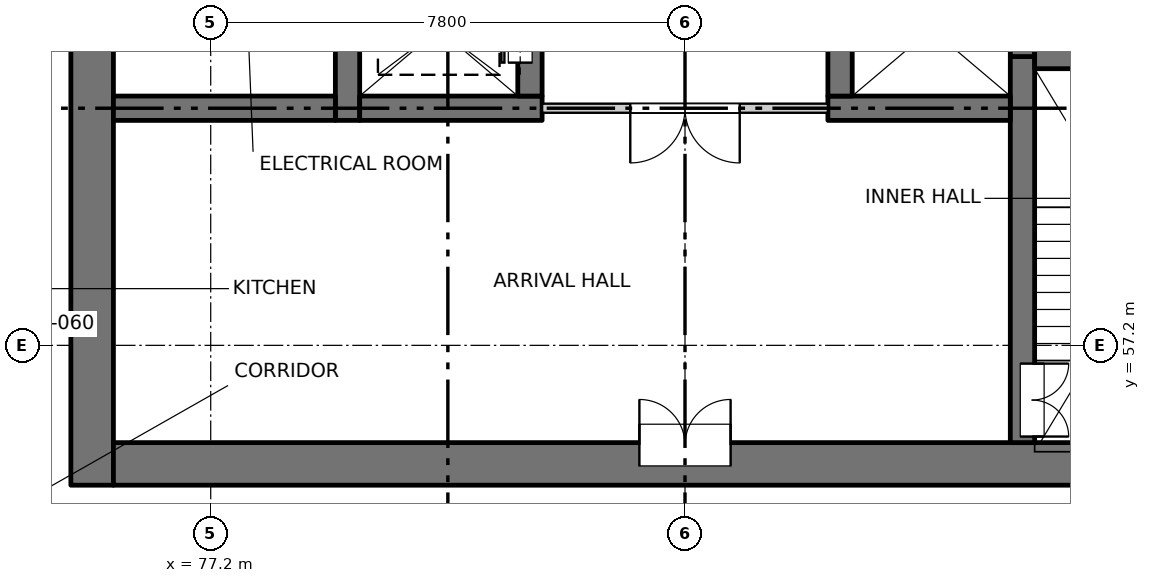
"""IFC4 building model, lengths in metres.
Left out: names, types, materials, properties, quantities, classifications, styles, units other than length and angle.
Written with IfcOpenShell. Run it as: python <this file> out.ifc"""

import sys

from ifc_helpers import new_model, si_unit, direction, frame, frame_2d, origin, place, context, subcontext, project, spatial, rectangle, extrude, element, fill, save


model = new_model("IFC4")
c1 = context("Model", 3, precision=1e-05, world=origin(), true_north=direction((0.0, 1.0)))
c2 = subcontext(c1, "Body", "Model", "MODEL_VIEW")
j1 = project(units=[si_unit("LENGTHUNIT", "METRE"), si_unit("PLANEANGLEUNIT", "RADIAN")], contexts=[c1])
p1 = place(None, origin())
s1 = spatial("IfcSite", under=j1, at=p1, CompositionType="ELEMENT")
p2 = place(p1, origin())
s2 = spatial("IfcBuilding", under=s1, at=p2, CompositionType="ELEMENT")
p3 = place(p2, frame((0.0, 0.0, 58.0)))
s3 = spatial("IfcBuildingStorey", under=s2, at=p3, CompositionType="ELEMENT", Elevation=58.0)
p4 = place(p3, frame((75.25, 54.9, -0.25), z_axis=(0.0, 0.0, 1.0), x_axis=(0.0, 1.0, 0.0)))
e1 = element("IfcWall", 1, at=p4, inside=s3, PredefinedType="SOLIDWALL", context=c2, shape_type="SweptSolid", body=[
    extrude(rectangle(XDim=22.4, YDim=0.7, at=frame_2d((11.2, 0.0))), origin(), (0.0, 0.0, 1.0), 3.4),
])
p5 = place(p4, frame((7.55, 0.0, 0.25)))
e2 = element("IfcOpeningElement", 2, at=p5, cuts=e1, PredefinedType="OPENING", context=c2, shape_type="SweptSolid", body=[
    extrude(rectangle(XDim=0.9, YDim=2.1, at=frame_2d((0.45, 1.05))), frame((0.0, 0.36, 0.0), z_axis=(0.0, -1.0, 0.0), x_axis=(1.0, 0.0, 0.0)), (0.0, 0.0, 1.0), 0.72),
])
p6 = place(p4, frame((12.2, 0.0, 0.25)))
e3 = element("IfcOpeningElement", 3, at=p6, cuts=e1, PredefinedType="OPENING", context=c2, shape_type="SweptSolid", body=[
    extrude(rectangle(XDim=0.9, YDim=2.1, at=frame_2d((0.45, 1.05))), frame((0.0, 0.36, 0.0), z_axis=(0.0, -1.0, 0.0), x_axis=(1.0, 0.0, 0.0)), (0.0, 0.0, 1.0), 0.72),
])
p7 = place(p4, frame((16.7, 0.0, 0.25)))
e4 = element("IfcOpeningElement", 4, at=p7, cuts=e1, PredefinedType="OPENING", context=c2, shape_type="SweptSolid", body=[
    extrude(rectangle(XDim=0.9, YDim=2.1, at=frame_2d((0.45, 1.05))), frame((0.0, 0.36, 0.0), z_axis=(0.0, -1.0, 0.0), x_axis=(1.0, 0.0, 0.0)), (0.0, 0.0, 1.0), 0.72),
])
p8 = place(p4, frame((20.15, 0.0, 0.25)))
e5 = element("IfcOpeningElement", 5, at=p8, cuts=e1, PredefinedType="OPENING", context=c2, shape_type="SweptSolid", body=[
    extrude(rectangle(XDim=0.9, YDim=2.1, at=frame_2d((0.45, 1.05))), frame((0.0, 0.36, 0.0), z_axis=(0.0, -1.0, 0.0), x_axis=(1.0, 0.0, 0.0)), (0.0, 0.0, 1.0), 0.72),
])
p9 = place(p3, frame((75.6, 55.25, -0.25), z_axis=(0.0, 0.0, 1.0), x_axis=(1.0, 0.0, 0.0)))
e6 = element("IfcWall", 6, at=p9, inside=s3, PredefinedType="SOLIDWALL", context=c2, shape_type="SweptSolid", body=[
    extrude(rectangle(XDim=18.8, YDim=0.7, at=frame_2d((9.4, 0.0))), origin(), (0.0, 0.0, 1.0), 3.4),
])
p10 = place(p9, frame((8.65, 0.0, 0.25)))
e7 = element("IfcOpeningElement", 7, at=p10, cuts=e6, PredefinedType="OPENING", context=c2, shape_type="SweptSolid", body=[
    extrude(rectangle(XDim=1.5, YDim=2.1, at=frame_2d((0.75, 1.05))), frame((0.0, 0.36, 0.0), z_axis=(0.0, -1.0, 0.0), x_axis=(1.0, 0.0, 0.0)), (0.0, 0.0, 1.0), 0.72),
])
p11 = place(p3, frame((79.45, 60.9, -0.25), z_axis=(0.0, 0.0, 1.0), x_axis=(0.0, 1.0, 0.0)))
e8 = element("IfcWall", 8, at=p11, inside=s3, PredefinedType="SOLIDWALL", context=c2, shape_type="SweptSolid", body=[
    extrude(rectangle(XDim=16.4, YDim=0.4, at=frame_2d((8.2, 0.0))), origin(), (0.0, 0.0, 1.0), 3.4),
])
p12 = place(p3, frame((90.55, 55.6, -0.25), z_axis=(0.0, 0.0, 1.0), x_axis=(0.0, 1.0, 0.0)))
e9 = element("IfcWall", 9, at=p12, inside=s3, PredefinedType="SOLIDWALL", context=c2, shape_type="SweptSolid", body=[
    extrude(rectangle(XDim=6.35, YDim=0.4, at=frame_2d((3.175, 0.0))), origin(), (0.0, 0.0, 1.0), 3.4),
])
p13 = place(p12, frame((0.1, 0.0, 0.25)))
e10 = element("IfcOpeningElement", 10, at=p13, cuts=e9, PredefinedType="OPENING", context=c2, shape_type="SweptSolid", body=[
    extrude(rectangle(XDim=1.2, YDim=2.1, at=frame_2d((0.6, 1.05))), frame((0.0, 0.21, 0.0), z_axis=(0.0, -1.0, 0.0), x_axis=(1.0, 0.0, 0.0)), (0.0, 0.0, 1.0), 0.42),
])
p14 = place(p3, frame((90.55, 61.95, -0.25), z_axis=(0.0, 0.0, 1.0), x_axis=(0.0, 1.0, 0.0)))
e11 = element("IfcWall", 11, at=p14, inside=s3, PredefinedType="SOLIDWALL", context=c2, shape_type="SweptSolid", body=[
    extrude(rectangle(XDim=15.35, YDim=0.4, at=frame_2d((7.675, 0.0))), origin(), (0.0, 0.0, 1.0), 3.4),
])
p15 = place(p3, frame((79.65, 61.1, -0.25), z_axis=(0.0, 0.0, 1.0), x_axis=(1.0, 0.0, 0.0)))
e12 = element("IfcWall", 12, at=p15, inside=s3, PredefinedType="SOLIDWALL", context=c2, shape_type="SweptSolid", body=[
    extrude(rectangle(XDim=3.0, YDim=0.4, at=frame_2d((1.5, 0.0))), origin(), (0.0, 0.0, 1.0), 3.4),
])
p16 = place(p3, frame((82.45, 61.3, -0.25), z_axis=(0.0, 0.0, 1.0), x_axis=(0.0, 1.0, 0.0)))
e13 = element("IfcWall", 13, at=p16, inside=s3, PredefinedType="SOLIDWALL", context=c2, shape_type="SweptSolid", body=[
    extrude(rectangle(XDim=2.2, YDim=0.4, at=frame_2d((1.1, 0.0))), origin(), (0.0, 0.0, 1.0), 3.4),
])
p17 = place(p16, frame((0.55, 0.0, 0.25)))
e14 = element("IfcOpeningElement", 14, at=p17, cuts=e13, PredefinedType="OPENING", context=c2, shape_type="SweptSolid", body=[
    extrude(rectangle(XDim=1.1, YDim=2.1, at=frame_2d((0.55, 1.05))), frame((0.0, 0.21, 0.0), z_axis=(0.0, -1.0, 0.0), x_axis=(1.0, 0.0, 0.0)), (0.0, 0.0, 1.0), 0.42),
])
p18 = place(p3, frame((87.35, 61.1, -0.25), z_axis=(0.0, 0.0, 1.0), x_axis=(1.0, 0.0, 0.0)))
e15 = element("IfcWall", 15, at=p18, inside=s3, PredefinedType="SOLIDWALL", context=c2, shape_type="SweptSolid", body=[
    extrude(rectangle(XDim=3.0, YDim=0.4, at=frame_2d((1.5, 0.0))), origin(), (0.0, 0.0, 1.0), 3.4),
])
p19 = place(p3, frame((87.55, 61.3, -0.25), z_axis=(0.0, 0.0, 1.0), x_axis=(0.0, 1.0, 0.0)))
e16 = element("IfcWall", 16, at=p19, inside=s3, PredefinedType="SOLIDWALL", context=c2, shape_type="SweptSolid", body=[
    extrude(rectangle(XDim=2.2, YDim=0.4, at=frame_2d((1.1, 0.0))), origin(), (0.0, 0.0, 1.0), 3.4),
])
for number, where, z_axis, x_axis in (
    (17, (75.6, 61.1, -0.25), (0.0, 0.0, 1.0), (1.0, 0.0, 0.0)),
    (18, (90.75, 61.95, -0.25), (0.0, 0.0, 1.0), (1.0, 0.0, 0.0)),
):
    element("IfcWall", number, at=place(p3, frame(where, z_axis=z_axis, x_axis=x_axis)), inside=s3, PredefinedType="SOLIDWALL", context=c2, shape_type="SweptSolid", body=[
        extrude(rectangle(XDim=3.65, YDim=0.4, at=frame_2d((1.825, 0.0))), origin(), (0.0, 0.0, 1.0), 3.4),
    ])
p20 = place(p3, frame((82.65, 61.1, 0.0), z_axis=(0.0, 0.0, 1.0), x_axis=(1.0, 0.0, 0.0)))
e19 = element("IfcWall", 19, at=p20, inside=s3, PredefinedType="PARTITIONING", context=c2, shape_type="SweptSolid", body=[
    extrude(rectangle(XDim=4.7, YDim=0.15, at=frame_2d((2.35, 0.0))), origin(), (0.0, 0.0, 1.0), 3.15),
])
p21 = place(p20, frame((1.45, 0.0, 0.0)))
e20 = element("IfcOpeningElement", 20, at=p21, cuts=e19, PredefinedType="OPENING", context=c2, shape_type="SweptSolid", body=[
    extrude(rectangle(XDim=1.8, YDim=2.1, at=frame_2d((0.9, 1.05))), frame((0.0, 0.085, 0.0), z_axis=(0.0, -1.0, 0.0), x_axis=(1.0, 0.0, 0.0)), (0.0, 0.0, 1.0), 0.17),
])
p22 = place(p10, origin())
e21 = element("IfcDoor", 21, at=p22, inside=s3, OperationType="DOUBLE_DOOR_SINGLE_SWING", PredefinedType="DOOR", context=c2, shape_type="SweptSolid", body=[
    extrude(rectangle(XDim=1.5, YDim=2.1, at=frame_2d((0.75, 1.05))), frame((0.0, 0.335, 0.0), z_axis=(0.0, -1.0, 0.0), x_axis=(1.0, 0.0, 0.0)), (0.0, 0.0, 1.0), 0.05),
])
fill(e7, e21)
p23 = place(p13, origin())
e22 = element("IfcDoor", 22, at=p23, inside=s3, OperationType="DOUBLE_DOOR_SINGLE_SWING", PredefinedType="DOOR", context=c2, shape_type="SweptSolid", body=[
    extrude(rectangle(XDim=1.2, YDim=2.1, at=frame_2d((0.6, 1.05))), frame((0.0, -0.135, 0.0), z_axis=(0.0, -1.0, 0.0), x_axis=(1.0, 0.0, 0.0)), (0.0, 0.0, 1.0), 0.05),
])
fill(e10, e22)
p24 = place(p21, origin())
e23 = element("IfcDoor", 23, at=p24, inside=s3, OperationType="DOUBLE_DOOR_SINGLE_SWING", PredefinedType="DOOR", context=c2, shape_type="SweptSolid", body=[
    extrude(rectangle(XDim=1.8, YDim=2.1, at=frame_2d((0.9, 1.05))), frame((0.0, 0.025, 0.0), z_axis=(0.0, -1.0, 0.0), x_axis=(1.0, 0.0, 0.0)), (0.0, 0.0, 1.0), 0.05),
])
fill(e20, e23)
p25 = place(p17, origin())
e24 = element("IfcDoor", 24, at=p25, inside=s3, OperationType="SLIDING_TO_RIGHT", PredefinedType="DOOR", context=c2, shape_type="SweptSolid", body=[
    extrude(rectangle(XDim=1.1, YDim=2.1, at=frame_2d((0.55, 1.05))), frame((0.0, 0.185, 0.0), z_axis=(0.0, -1.0, 0.0), x_axis=(1.0, 0.0, 0.0)), (0.0, 0.0, 1.0), 0.05),
])
fill(e14, e24)
save(model, sys.argv[1])
